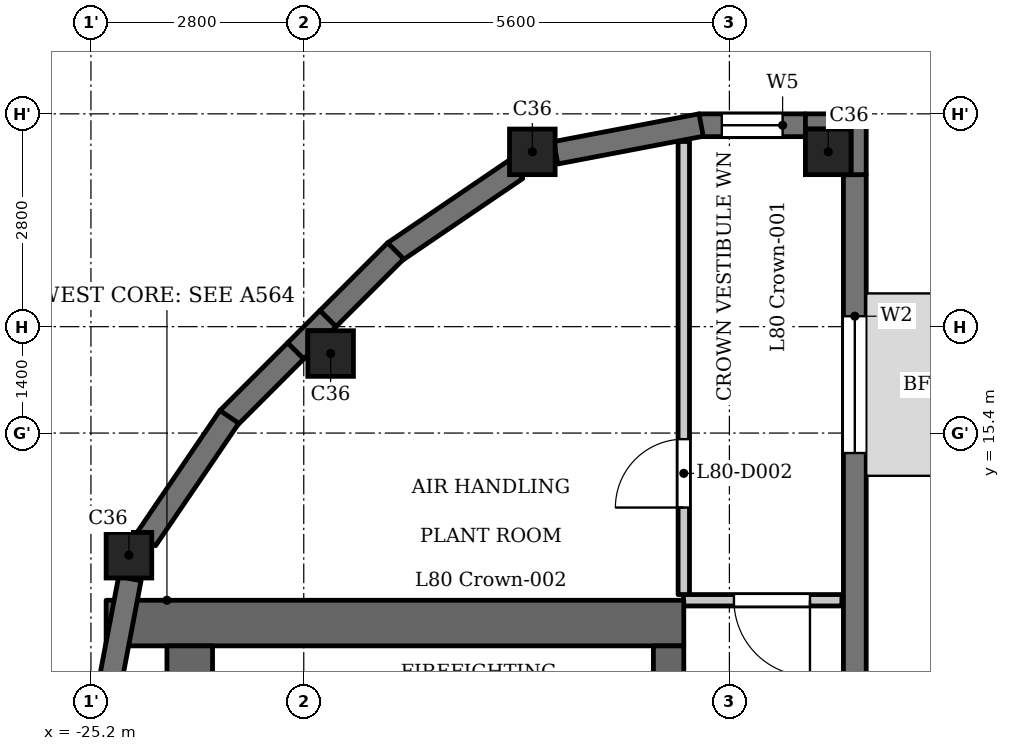
"""IFC4 building model, lengths in metres.
Left out: names, types, materials, properties, quantities, classifications, styles, units other than length and angle.
Written with IfcOpenShell. Run it as: python <this file> out.ifc"""

import sys

from ifc_helpers import new_model, si_unit, direction, frame, frame_2d, origin, origin_2d, place, context, subcontext, project, spatial, polyline, rectangle, outline, extrude, element, fill, save


model = new_model("IFC4")
c1 = context("Model", 3, precision=1e-05, world=origin(), true_north=direction((0.0, 1.0)))
c2 = subcontext(c1, "Body", "Model", "MODEL_VIEW")
j1 = project(units=[si_unit("LENGTHUNIT", "METRE"), si_unit("PLANEANGLEUNIT", "RADIAN")], contexts=[c1])
p1 = place(None, origin())
s1 = spatial("IfcSite", under=j1, at=p1, CompositionType="ELEMENT")
p2 = place(p1, origin())
s2 = spatial("IfcBuilding", under=s1, at=p2, CompositionType="ELEMENT")
p3 = place(p2, frame((0.0, 0.0, 310.4)))
s3 = spatial("IfcBuildingStorey", under=s2, at=p3, CompositionType="ELEMENT", Elevation=310.4)
for number, where, z_axis, x_axis in (
    (1, (-24.7, 13.793, 0.0), (0.0, 0.0, 1.0), (1.0, 0.0, 0.0)),
    (2, (-22.046, 16.446, 0.0), (0.0, 0.0, 1.0), (1.0, 0.0, 0.0)),
    (3, (-19.393, 19.1, 0.0), (0.0, 0.0, 1.0), (1.0, 0.0, 0.0)),
    (4, (-15.5, 19.1, 0.0), (0.0, 0.0, 1.0), (1.0, 0.0, 0.0)),
):
    element("IfcColumn", number, at=place(p3, frame(where, z_axis=z_axis, x_axis=x_axis)), inside=s3, PredefinedType="COLUMN", context=c2, shape_type="SweptSolid", body=[
        extrude(rectangle(XDim=0.6, YDim=0.6, at=origin_2d()), origin(), (0.0, 0.0, 1.0), 3.5),
    ])
p4 = place(p3, frame((-15.15, 11.5, 0.0), z_axis=(0.0, 0.0, 1.0), x_axis=(0.0, 1.0, 0.0)))
e5 = element("IfcWall", 5, at=p4, inside=s3, PredefinedType="SOLIDWALL", context=c2, shape_type="SweptSolid", body=[
    extrude(rectangle(XDim=7.3, YDim=0.3, at=frame_2d((3.65, 0.0))), origin(), (0.0, 0.0, 1.0), 2.8),
])
p5 = place(p4, frame((3.637, 0.0, 0.9)))
e6 = element("IfcOpeningElement", 6, at=p5, cuts=e5, PredefinedType="OPENING", context=c2, shape_type="SweptSolid", body=[
    extrude(rectangle(XDim=1.8, YDim=1.25, at=frame_2d((0.9, 0.625))), frame((0.0, 0.16, 0.0), z_axis=(0.0, -1.0, 0.0), x_axis=(1.0, 0.0, 0.0)), (0.0, 0.0, 1.0), 0.32),
])
p6 = place(p3, frame((-15.8, 19.45, 0.0), z_axis=(0.0, 0.0, 1.0), x_axis=(-1.0, 0.0, 0.0)))
e7 = element("IfcWall", 7, at=p6, inside=s3, PredefinedType="SOLIDWALL", context=c2, shape_type="SweptSolid", body=[
    extrude(rectangle(XDim=1.4, YDim=0.3, at=frame_2d((0.7, 0.0))), origin(), (0.0, 0.0, 1.0), 2.8),
])
p7 = place(p6, frame((0.3, 0.0, 0.6)))
e8 = element("IfcOpeningElement", 8, at=p7, cuts=e7, PredefinedType="OPENING", context=c2, shape_type="SweptSolid", body=[
    extrude(rectangle(XDim=0.8, YDim=1.55, at=frame_2d((0.4, 0.775))), frame((0.0, 0.16, 0.0), z_axis=(0.0, -1.0, 0.0), x_axis=(1.0, 0.0, 0.0)), (0.0, 0.0, 1.0), 0.32),
])
for number, where, z_axis, x_axis in (
    (9, (-17.172, 19.453, 0.0), (0.0, 0.0, 1.0), (-0.982, -0.187, 0.0)),
    (10, (-19.602, 18.874, 0.0), (0.0, 0.0, 1.0), (-0.827, -0.562, 0.0)),
):
    element("IfcWall", number, at=place(p3, frame(where, z_axis=z_axis, x_axis=x_axis)), inside=s3, PredefinedType="SOLIDWALL", context=c2, shape_type="SweptSolid", body=[
        extrude(rectangle(XDim=1.948, YDim=0.3, at=frame_2d((0.974, 0.0))), origin(), (0.0, 0.0, 1.0), 2.2),
    ])
for number, where, z_axis, x_axis in (
    (11, (-21.191, 17.797, 0.0), (0.0, 0.0, 1.0), (-0.707, -0.707, 0.0)),
    (12, (-22.506, 16.482, 0.0), (0.0, 0.0, 1.0), (-0.707, -0.707, 0.0)),
):
    element("IfcWall", number, at=place(p3, frame(where, z_axis=z_axis, x_axis=x_axis)), inside=s3, PredefinedType="SOLIDWALL", context=c2, shape_type="SweptSolid", body=[
        extrude(rectangle(XDim=1.26, YDim=0.3, at=frame_2d((0.63, 0.0))), origin(), (0.0, 0.0, 1.0), 2.8),
    ])
p8 = place(p3, frame((-23.379, 15.613, 0.0), z_axis=(0.0, 0.0, 1.0), x_axis=(-0.562025435703, -0.827119948752, 0.0)))
e13 = element("IfcWall", 13, at=p8, inside=s3, PredefinedType="SOLIDWALL", context=c2, shape_type="SweptSolid", body=[
    extrude(rectangle(XDim=1.948, YDim=0.3, at=frame_2d((0.974, 0.0))), origin(), (0.0, 0.0, 1.0), 2.2),
])
p9 = place(p3, frame((-24.688, 13.485, 0.0), z_axis=(0.0, 0.0, 1.0), x_axis=(-0.187354129902, -0.982292436095, 0.0)))
e14 = element("IfcWall", 14, at=p9, inside=s3, PredefinedType="SOLIDWALL", context=c2, shape_type="SweptSolid", body=[
    extrude(rectangle(XDim=1.947, YDim=0.3, at=frame_2d((0.973, 0.0))), origin(), (0.0, 0.0, 1.0), 2.2),
])
p10 = place(p3, frame((-17.4, 12.9, 0.0), z_axis=(0.0, 0.0, 1.0), x_axis=(-1.0, 0.0, 0.0)))
e15 = element("IfcWall", 15, at=p10, inside=s3, PredefinedType="SHEAR", context=c2, shape_type="SweptSolid", body=[
    extrude(rectangle(XDim=7.6, YDim=0.6, at=frame_2d((3.8, 0.0))), origin(), (0.0, 0.0, 1.0), 2.8),
])
p11 = place(p3, frame((-17.6, -12.6, 0.0), z_axis=(0.0, 0.0, 1.0), x_axis=(0.0, 1.0, 0.0)))
e16 = element("IfcWall", 16, at=p11, inside=s3, PredefinedType="SHEAR", context=c2, shape_type="SweptSolid", body=[
    extrude(rectangle(XDim=25.2, YDim=0.4, at=frame_2d((12.6, 0.0))), origin(), (0.0, 0.0, 1.0), 2.8),
])
p12 = place(p11, frame((6.475, 0.0, 0.0)))
e17 = element("IfcOpeningElement", 17, at=p12, cuts=e16, PredefinedType="OPENING", context=c2, shape_type="SweptSolid", body=[
    extrude(rectangle(XDim=0.9, YDim=2.1, at=frame_2d((0.45, 1.05))), frame((0.0, 0.21, 0.0), z_axis=(0.0, -1.0, 0.0), x_axis=(1.0, 0.0, 0.0)), (0.0, 0.0, 1.0), 0.42),
])
p13 = place(p11, frame((10.075, 0.0, 0.0)))
e18 = element("IfcOpeningElement", 18, at=p13, cuts=e16, PredefinedType="OPENING", context=c2, shape_type="SweptSolid", body=[
    extrude(rectangle(XDim=0.9, YDim=2.1, at=frame_2d((0.45, 1.05))), frame((0.0, 0.21, 0.0), z_axis=(0.0, -1.0, 0.0), x_axis=(1.0, 0.0, 0.0)), (0.0, 0.0, 1.0), 0.42),
])
p14 = place(p11, frame((17.05, 0.0, 0.0)))
e19 = element("IfcOpeningElement", 19, at=p14, cuts=e16, PredefinedType="OPENING", context=c2, shape_type="SweptSolid", body=[
    extrude(rectangle(XDim=0.9, YDim=2.1, at=frame_2d((0.45, 1.05))), frame((0.0, 0.21, 0.0), z_axis=(0.0, -1.0, 0.0), x_axis=(1.0, 0.0, 0.0)), (0.0, 0.0, 1.0), 0.42),
])
p15 = place(p11, frame((23.25, 0.0, 0.0)))
e20 = element("IfcOpeningElement", 20, at=p15, cuts=e16, PredefinedType="OPENING", context=c2, shape_type="SweptSolid", body=[
    extrude(rectangle(XDim=1.1, YDim=2.1, at=frame_2d((0.55, 1.05))), frame((0.0, 0.21, 0.0), z_axis=(0.0, -1.0, 0.0), x_axis=(1.0, 0.0, 0.0)), (0.0, 0.0, 1.0), 0.42),
])
p16 = place(p11, frame((0.85, 0.0, 0.0)))
e21 = element("IfcOpeningElement", 21, at=p16, cuts=e16, PredefinedType="OPENING", context=c2, shape_type="SweptSolid", body=[
    extrude(rectangle(XDim=1.1, YDim=2.1, at=frame_2d((0.55, 1.05))), frame((0.0, 0.21, 0.0), z_axis=(0.0, -1.0, 0.0), x_axis=(1.0, 0.0, 0.0)), (0.0, 0.0, 1.0), 0.42),
])
p17 = place(p11, frame((13.075, 0.0, 0.0)))
e22 = element("IfcOpeningElement", 22, at=p17, cuts=e16, PredefinedType="OPENING", context=c2, shape_type="SweptSolid", body=[
    extrude(rectangle(XDim=1.8, YDim=2.1, at=frame_2d((0.9, 1.05))), frame((0.0, 0.21, 0.0), z_axis=(0.0, -1.0, 0.0), x_axis=(1.0, 0.0, 0.0)), (0.0, 0.0, 1.0), 0.42),
])
p18 = place(p3, frame((-23.9, -12.6, 0.0), z_axis=(0.0, 0.0, 1.0), x_axis=(0.0, 1.0, 0.0)))
e23 = element("IfcWall", 23, at=p18, inside=s3, PredefinedType="SHEAR", context=c2, shape_type="SweptSolid", body=[
    extrude(rectangle(XDim=25.2, YDim=0.6, at=frame_2d((12.6, 0.0))), origin(), (0.0, 0.0, 1.0), 2.8),
])
p19 = place(p3, frame((-17.405, 13.2, 0.0), z_axis=(0.0, 0.0, 1.0), x_axis=(1.0, 0.0, 0.0)))
e24 = element("IfcWall", 24, at=p19, inside=s3, PredefinedType="PARTITIONING", context=c2, shape_type="SweptSolid", body=[
    extrude(rectangle(XDim=2.085, YDim=0.15, at=frame_2d((1.042, 0.0))), origin(), (0.0, 0.0, 1.0), 2.8),
])
p20 = place(p19, frame((0.665, 0.0, 0.0)))
e25 = element("IfcOpeningElement", 25, at=p20, cuts=e24, PredefinedType="OPENING", context=c2, shape_type="SweptSolid", body=[
    extrude(rectangle(XDim=1.0, YDim=2.1, at=frame_2d((0.5, 1.05))), frame((0.0, 0.085, 0.0), z_axis=(0.0, -1.0, 0.0), x_axis=(1.0, 0.0, 0.0)), (0.0, 0.0, 1.0), 0.17),
])
p21 = place(p3, frame((-17.4, 13.275, 0.0), z_axis=(0.0, 0.0, 1.0), x_axis=(0.0, 1.0, 0.0)))
e26 = element("IfcWall", 26, at=p21, inside=s3, PredefinedType="PARTITIONING", context=c2, shape_type="SweptSolid", body=[
    extrude(rectangle(XDim=5.961, YDim=0.15, at=frame_2d((2.981, 0.0))), origin(), (0.0, 0.0, 1.0), 2.8),
])
p22 = place(p21, frame((1.145, 0.0, 0.0)))
e27 = element("IfcOpeningElement", 27, at=p22, cuts=e26, PredefinedType="OPENING", context=c2, shape_type="SweptSolid", body=[
    extrude(rectangle(XDim=0.9, YDim=2.1, at=frame_2d((0.45, 1.05))), frame((0.0, 0.085, 0.0), z_axis=(0.0, -1.0, 0.0), x_axis=(1.0, 0.0, 0.0)), (0.0, 0.0, 1.0), 0.17),
])
p23 = place(p3, origin())
e28 = element("IfcWall", 28, at=p23, inside=s3, PredefinedType="SOLIDWALL", context=c2, shape_type="SweptSolid", body=[
    extrude(outline(polyline([(-21.976, 16.8), (-22.188, 17.012), (-22.612, 16.588), (-22.4, 16.376), (-22.346, 16.429), (-22.346, 16.746), (-22.029, 16.746), (-21.976, 16.8)])), origin(), (0.0, 0.0, 1.0), 2.8),
])
e29 = element("IfcWall", 29, at=p23, inside=s3, PredefinedType="SOLIDWALL", context=c2, shape_type="SweptSolid", body=[
    extrude(outline(polyline([(-15.0, 18.8), (-15.0, 19.6), (-15.8, 19.6), (-15.8, 19.4), (-15.2, 19.4), (-15.2, 18.8), (-15.0, 18.8)])), origin(), (0.0, 0.0, 1.0), 2.8),
])
p24 = place(p20, origin())
e30 = element("IfcDoor", 30, at=p24, inside=s3, OperationType="SINGLE_SWING_RIGHT", PredefinedType="DOOR", context=c2, shape_type="SweptSolid", body=[
    extrude(rectangle(XDim=1.0, YDim=2.1, at=frame_2d((0.5, 1.05))), frame((0.0, 0.025, 0.0), z_axis=(0.0, -1.0, 0.0), x_axis=(1.0, 0.0, 0.0)), (0.0, 0.0, 1.0), 0.05),
])
fill(e25, e30)
p25 = place(p22, origin())
e31 = element("IfcDoor", 31, at=p25, inside=s3, OperationType="SINGLE_SWING_RIGHT", PredefinedType="DOOR", context=c2, shape_type="SweptSolid", body=[
    extrude(rectangle(XDim=0.9, YDim=2.1, at=frame_2d((0.45, 1.05))), frame((0.0, 0.025, 0.0), z_axis=(0.0, -1.0, 0.0), x_axis=(1.0, 0.0, 0.0)), (0.0, 0.0, 1.0), 0.05),
])
fill(e27, e31)
p26 = place(p5, origin())
e32 = element("IfcWindow", 32, at=p26, inside=s3, PartitioningType="SINGLE_PANEL", PredefinedType="WINDOW", context=c2, shape_type="SweptSolid", body=[
    extrude(rectangle(XDim=1.8, YDim=1.25, at=frame_2d((0.9, 0.625))), frame((0.0, 0.03, 0.0), z_axis=(0.0, -1.0, 0.0), x_axis=(1.0, 0.0, 0.0)), (0.0, 0.0, 1.0), 0.06),
])
fill(e6, e32)
p27 = place(p7, origin())
e33 = element("IfcWindow", 33, at=p27, inside=s3, PartitioningType="SINGLE_PANEL", PredefinedType="WINDOW", context=c2, shape_type="SweptSolid", body=[
    extrude(rectangle(XDim=0.8, YDim=1.55, at=frame_2d((0.4, 0.775))), frame((0.0, 0.03, 0.0), z_axis=(0.0, -1.0, 0.0), x_axis=(1.0, 0.0, 0.0)), (0.0, 0.0, 1.0), 0.06),
])
fill(e8, e33)
save(model, sys.argv[1])
